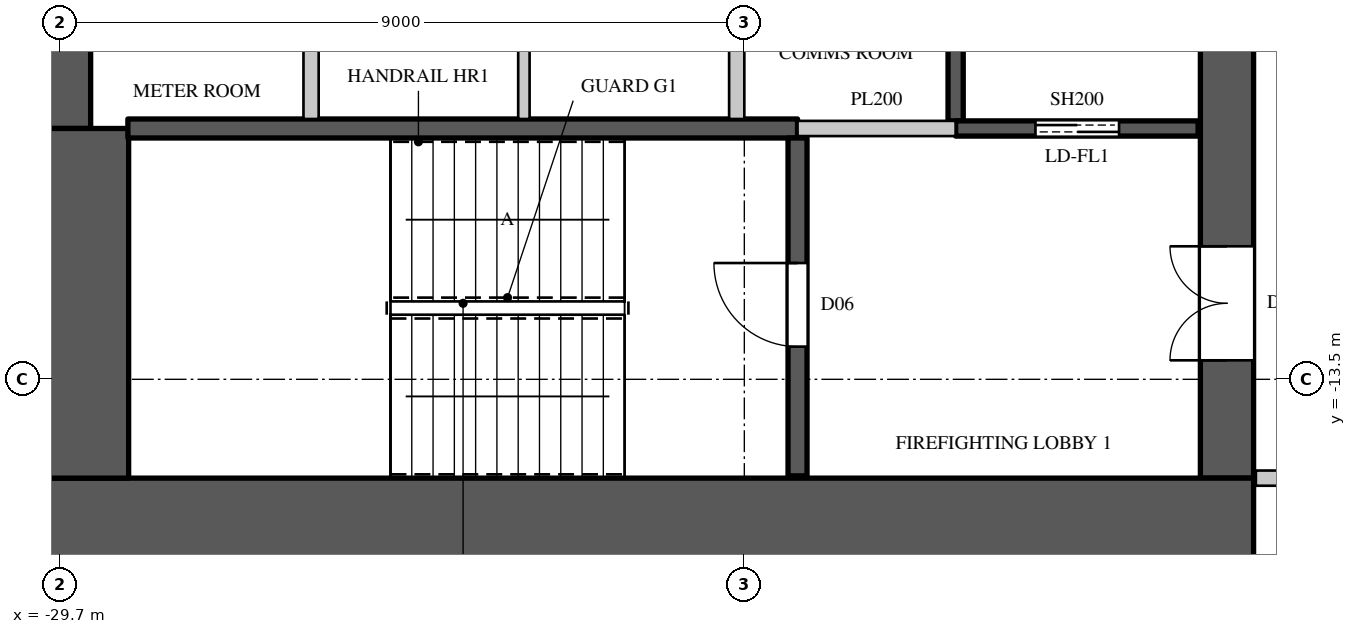
"""IFC4 building model, lengths in metres.
Left out: names, types, materials, properties, quantities, classifications, styles, units other than length and angle.
Written with IfcOpenShell. Run it as: python <this file> out.ifc"""

import sys

from ifc_helpers import new_model, si_unit, direction, frame, frame_2d, origin, place, context, subcontext, project, spatial, rectangle, extrude, element, fill, save


model = new_model("IFC4")
c1 = context("Model", 3, precision=1e-05, world=origin(), true_north=direction((0.0, 1.0)))
c2 = subcontext(c1, "Body", "Model", "MODEL_VIEW")
j1 = project(units=[si_unit("LENGTHUNIT", "METRE"), si_unit("PLANEANGLEUNIT", "RADIAN")], contexts=[c1])
p1 = place(None, origin())
s1 = spatial("IfcSite", under=j1, at=p1, CompositionType="ELEMENT")
p2 = place(p1, origin())
s2 = spatial("IfcBuilding", under=s1, at=p2, CompositionType="ELEMENT")
p3 = place(p2, frame((0.0, 0.0, 292.6)))
s3 = spatial("IfcBuildingStorey", under=s2, at=p3, CompositionType="ELEMENT", Elevation=292.6)
p4 = place(p3, frame((-30.0, -15.4, 0.0), z_axis=(0.0, 0.0, 1.0), x_axis=(1.0, 0.0, 0.0)))
e1 = element("IfcWall", 1, at=p4, inside=s3, PredefinedType="SHEAR", context=c2, shape_type="SweptSolid", body=[
    extrude(rectangle(XDim=16.0, YDim=1.2, at=frame_2d((8.0, 0.0))), origin(), (0.0, 0.0, 1.0), 4.1),
])
p5 = place(p3, frame((-14.35, -14.8, 0.0), z_axis=(0.0, 0.0, 1.0), x_axis=(0.0, 1.0, 0.0)))
e2 = element("IfcWall", 2, at=p5, inside=s3, PredefinedType="SHEAR", context=c2, shape_type="SweptSolid", body=[
    extrude(rectangle(XDim=29.6, YDim=0.7, at=frame_2d((14.8, 0.0))), origin(), (0.0, 0.0, 1.0), 4.1),
])
p6 = place(p5, frame((1.55, 0.0, 0.0)))
e3 = element("IfcOpeningElement", 3, at=p6, cuts=e2, PredefinedType="OPENING", context=c2, shape_type="SweptSolid", body=[
    extrude(rectangle(XDim=1.5, YDim=2.4, at=frame_2d((0.75, 1.2))), frame((0.0, 0.36, 0.0), z_axis=(0.0, -1.0, 0.0), x_axis=(1.0, 0.0, 0.0)), (0.0, 0.0, 1.0), 0.72),
])
p7 = place(p5, frame((26.55, 0.0, 0.0)))
e4 = element("IfcOpeningElement", 4, at=p7, cuts=e2, PredefinedType="OPENING", context=c2, shape_type="SweptSolid", body=[
    extrude(rectangle(XDim=1.5, YDim=2.4, at=frame_2d((0.75, 1.2))), frame((0.0, 0.36, 0.0), z_axis=(0.0, -1.0, 0.0), x_axis=(1.0, 0.0, 0.0)), (0.0, 0.0, 1.0), 0.72),
])
p8 = place(p5, frame((8.45, 0.0, 0.0)))
e5 = element("IfcOpeningElement", 5, at=p8, cuts=e2, PredefinedType="OPENING", context=c2, shape_type="SweptSolid", body=[
    extrude(rectangle(XDim=1.5, YDim=2.4, at=frame_2d((0.75, 1.2))), frame((0.0, 0.36, 0.0), z_axis=(0.0, -1.0, 0.0), x_axis=(1.0, 0.0, 0.0)), (0.0, 0.0, 1.0), 0.72),
])
p9 = place(p5, frame((19.65, 0.0, 0.0)))
e6 = element("IfcOpeningElement", 6, at=p9, cuts=e2, PredefinedType="OPENING", context=c2, shape_type="SweptSolid", body=[
    extrude(rectangle(XDim=1.5, YDim=2.4, at=frame_2d((0.75, 1.2))), frame((0.0, 0.36, 0.0), z_axis=(0.0, -1.0, 0.0), x_axis=(1.0, 0.0, 0.0)), (0.0, 0.0, 1.0), 0.72),
])
p10 = place(p5, frame((14.5, 0.0, 0.0)))
e7 = element("IfcOpeningElement", 7, at=p10, cuts=e2, PredefinedType="OPENING", context=c2, shape_type="SweptSolid", body=[
    extrude(rectangle(XDim=0.6, YDim=2.0, at=frame_2d((0.3, 1.0))), frame((0.0, 0.36, 0.0), z_axis=(0.0, -1.0, 0.0), x_axis=(1.0, 0.0, 0.0)), (0.0, 0.0, 1.0), 0.72),
])
p11 = place(p3, frame((-29.65, -10.2, 0.0), z_axis=(0.0, 0.0, 1.0), x_axis=(0.0, 1.0, 0.0)))
e8 = element("IfcWall", 8, at=p11, inside=s3, PredefinedType="SHEAR", context=c2, shape_type="SweptSolid", body=[
    extrude(rectangle(XDim=20.4, YDim=0.7, at=frame_2d((10.2, 0.0))), origin(), (0.0, 0.0, 1.0), 4.1),
])
p12 = place(p3, frame((-29.4, -14.8, 0.0), z_axis=(0.0, 0.0, 1.0), x_axis=(0.0, 1.0, 0.0)))
e9 = element("IfcWall", 9, at=p12, inside=s3, PredefinedType="SHEAR", context=c2, shape_type="SweptSolid", body=[
    extrude(rectangle(XDim=4.6, YDim=1.2, at=frame_2d((2.3, 0.0))), origin(), (0.0, 0.0, 1.0), 4.1),
])
p13 = place(p3, frame((-13.97, -14.8, 0.0), z_axis=(0.0, 0.0, 1.0), x_axis=(1.0, 0.0, 0.0)))
e10 = element("IfcWall", 10, at=p13, inside=s3, PredefinedType="PARTITIONING", context=c2, shape_type="SweptSolid", body=[
    extrude(rectangle(XDim=2.87, YDim=0.2, at=frame_2d((1.435, 0.0))), origin(), (0.0, 0.0, 1.0), 3.8),
])
p14 = place(p3, frame((-23.6, -10.075, 0.0), z_axis=(0.0, 0.0, 1.0), x_axis=(0.0, 1.0, 0.0)))
e11 = element("IfcWall", 11, at=p14, inside=s3, PredefinedType="PARTITIONING", context=c2, shape_type="SweptSolid", body=[
    extrude(rectangle(XDim=2.575, YDim=0.15, at=frame_2d((1.288, 0.0))), origin(), (0.0, 0.0, 1.0), 3.8),
])
for number, where, z_axis, x_axis in (
    (12, (-26.4, -10.075, 0.0), (0.0, 0.0, 1.0), (0.0, 1.0, 0.0)),
    (13, (-20.8, -10.075, 0.0), (0.0, 0.0, 1.0), (0.0, 1.0, 0.0)),
):
    element("IfcWall", number, at=place(p3, frame(where, z_axis=z_axis, x_axis=x_axis)), inside=s3, PredefinedType="PARTITIONING", context=c2, shape_type="SweptSolid", body=[
        extrude(rectangle(XDim=2.575, YDim=0.2, at=frame_2d((1.288, 0.0))), origin(), (0.0, 0.0, 1.0), 3.8),
    ])
p15 = place(p3, frame((-20.0, -10.2, 0.0), z_axis=(0.0, 0.0, 1.0), x_axis=(1.0, 0.0, 0.0)))
e14 = element("IfcWall", 14, at=p15, inside=s3, PredefinedType="PARTITIONING", context=c2, shape_type="SweptSolid", body=[
    extrude(rectangle(XDim=2.08, YDim=0.2, at=frame_2d((1.04, 0.0))), origin(), (0.0, 0.0, 1.0), 3.8),
])
p16 = place(p3, frame((-17.92, -10.1, 0.0), z_axis=(0.0, 0.0, 1.0), x_axis=(0.0, 1.0, 0.0)))
e15 = element("IfcWall", 15, at=p16, inside=s3, PredefinedType="SHEAR", context=c2, shape_type="SweptSolid", body=[
    extrude(rectangle(XDim=2.6, YDim=0.2, at=frame_2d((1.3, 0.0))), origin(), (0.0, 0.0, 1.0), 3.8),
])
p17 = place(p3, frame((-17.92, -10.2, 0.0), z_axis=(0.0, 0.0, 1.0), x_axis=(1.0, 0.0, 0.0)))
e16 = element("IfcWall", 16, at=p17, inside=s3, PredefinedType="SHEAR", context=c2, shape_type="SweptSolid", body=[
    extrude(rectangle(XDim=3.19, YDim=0.2, at=frame_2d((1.595, 0.0))), origin(), (0.0, 0.0, 1.0), 3.8),
])
p18 = place(p17, frame((1.05, 0.0, 0.0)))
e17 = element("IfcOpeningElement", 17, at=p18, cuts=e16, PredefinedType="OPENING", context=c2, shape_type="SweptSolid", body=[
    extrude(rectangle(XDim=1.1, YDim=2.2, at=frame_2d((0.55, 1.1))), frame((0.0, 0.11, 0.0), z_axis=(0.0, -1.0, 0.0), x_axis=(1.0, 0.0, 0.0)), (0.0, 0.0, 1.0), 0.22),
])
p19 = place(p3, frame((-28.81, -10.2, 0.0), z_axis=(0.0, 0.0, 1.0), x_axis=(1.0, 0.0, 0.0)))
e18 = element("IfcWall", 18, at=p19, inside=s3, PredefinedType="SHEAR", context=c2, shape_type="SweptSolid", body=[
    extrude(rectangle(XDim=8.81, YDim=0.25, at=frame_2d((4.405, 0.0))), origin(), (0.0, 0.0, 1.0), 3.8),
])
p20 = place(p3, frame((-20.0, -14.77, 0.0), z_axis=(0.0, 0.0, 1.0), x_axis=(0.0, 1.0, 0.0)))
e19 = element("IfcWall", 19, at=p20, inside=s3, PredefinedType="SHEAR", context=c2, shape_type="SweptSolid", body=[
    extrude(rectangle(XDim=4.445, YDim=0.25, at=frame_2d((2.223, 0.0))), origin(), (0.0, 0.0, 1.0), 3.8),
])
p21 = place(p20, frame((1.7, 0.0, 0.0)))
e20 = element("IfcOpeningElement", 20, at=p21, cuts=e19, PredefinedType="OPENING", context=c2, shape_type="SweptSolid", body=[
    extrude(rectangle(XDim=1.1, YDim=2.2, at=frame_2d((0.55, 1.1))), frame((0.0, 0.135, 0.0), z_axis=(0.0, -1.0, 0.0), x_axis=(1.0, 0.0, 0.0)), (0.0, 0.0, 1.0), 0.27),
])
p22 = place(p21, origin())
e21 = element("IfcDoor", 21, at=p22, inside=s3, OperationType="SINGLE_SWING_RIGHT", PredefinedType="DOOR", context=c2, shape_type="SweptSolid", body=[
    extrude(rectangle(XDim=1.1, YDim=2.2, at=frame_2d((0.55, 1.1))), frame((0.0, 0.025, 0.0), z_axis=(0.0, -1.0, 0.0), x_axis=(1.0, 0.0, 0.0)), (0.0, 0.0, 1.0), 0.05),
])
fill(e20, e21)
p23 = place(p18, origin())
e22 = element("IfcDoor", 22, at=p23, inside=s3, OperationType="DOUBLE_DOOR_SLIDING", PredefinedType="DOOR", context=c2, shape_type="SweptSolid", body=[
    extrude(rectangle(XDim=1.1, YDim=2.2, at=frame_2d((0.55, 1.1))), frame((0.0, 0.025, 0.0), z_axis=(0.0, -1.0, 0.0), x_axis=(1.0, 0.0, 0.0)), (0.0, 0.0, 1.0), 0.05),
])
fill(e17, e22)
p24 = place(p6, origin())
e23 = element("IfcDoor", 23, at=p24, inside=s3, OperationType="DOUBLE_DOOR_SINGLE_SWING", PredefinedType="DOOR", context=c2, shape_type="SweptSolid", body=[
    extrude(rectangle(XDim=1.5, YDim=2.4, at=frame_2d((0.75, 1.2))), frame((0.0, 0.345, 0.0), z_axis=(0.0, -1.0, 0.0), x_axis=(1.0, 0.0, 0.0)), (0.0, 0.0, 1.0), 0.05),
])
fill(e3, e23)
save(model, sys.argv[1])
